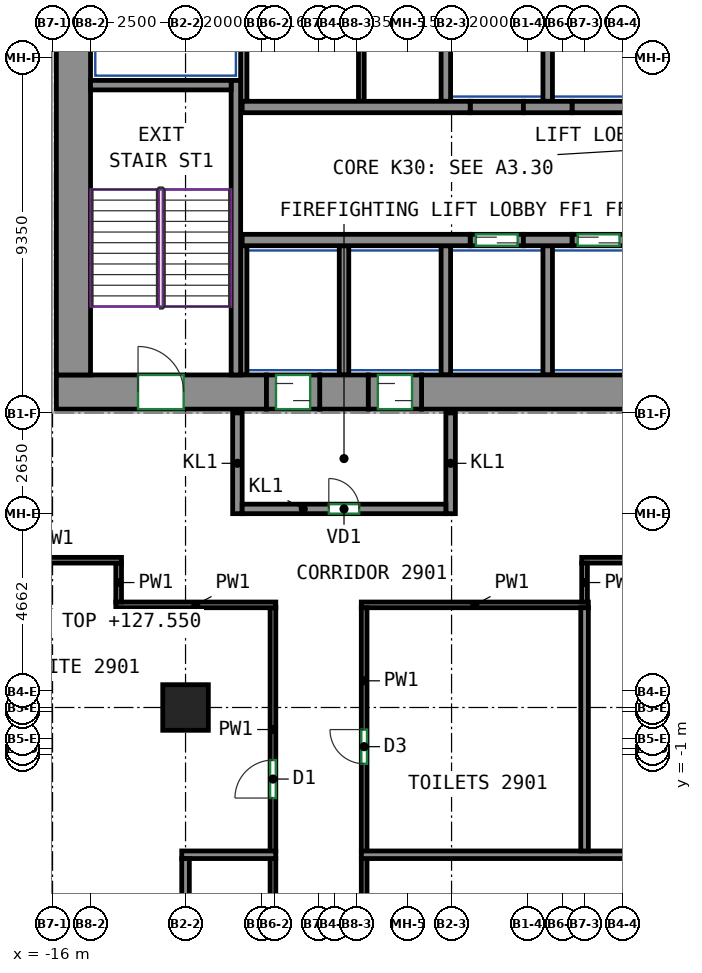
"""IFC4 building model, lengths in metres.
Left out: names, types, materials, properties, quantities, classifications, styles, units other than length and angle.
Written with IfcOpenShell. Run it as: python <this file> out.ifc"""

import sys

from ifc_helpers import new_model, si_unit, direction, frame, frame_2d, origin, origin_2d, place, context, subcontext, project, spatial, rectangle, extrude, source, transform, mapped, element, fill, save


model = new_model("IFC4")
c1 = context("Model", 3, precision=1e-05, world=origin(), true_north=direction((0.0, 1.0)))
c2 = subcontext(c1, "Body", "Model", "MODEL_VIEW")
j1 = project(units=[si_unit("LENGTHUNIT", "METRE"), si_unit("PLANEANGLEUNIT", "RADIAN")], contexts=[c1])
p1 = place(None, origin())
s1 = spatial("IfcSite", under=j1, at=p1, CompositionType="ELEMENT")
p2 = place(p1, origin())
s2 = spatial("IfcBuilding", under=s1, at=p2, CompositionType="ELEMENT")
p3 = place(p2, frame((0.0, 0.0, 124.6)))
s3 = spatial("IfcBuildingStorey", under=s2, at=p3, CompositionType="ELEMENT", Elevation=124.6)
m1 = source(origin(), c2, "Body", "SweptSolid", [
    extrude(rectangle(XDim=1.2, YDim=1.2, at=origin_2d()), origin(), (0.0, 0.0, 1.0), 3.6),
])
p4 = place(p3, frame((-12.5, 0.25, 0.0), z_axis=(0.0, 0.0, 1.0), x_axis=(1.0, 0.0, 0.0)))
e1 = element("IfcColumn", 1, at=p4, inside=s3, PredefinedType="COLUMN", context=c2, shape_type="MappedRepresentation", body=[
    mapped(m1, transform((0.0, 0.0, 0.0))),
])
m2 = source(origin(), c2, "Body", "SweptSolid", [
    extrude(rectangle(XDim=5.53, YDim=0.9, at=frame_2d((2.765, 0.0))), origin(), (0.0, 0.0, 1.0), 3.6),
])
p5 = place(p3, frame((-15.9, 8.55, 0.0), z_axis=(0.0, 0.0, 1.0), x_axis=(1.0, 0.0, 0.0)))
e2 = element("IfcWall", 2, at=p5, inside=s3, PredefinedType="SHEAR", context=c2, shape_type="MappedRepresentation", body=[
    mapped(m2, transform((0.0, 0.0, 0.0))),
])
p6 = place(p5, frame((2.15, 0.0, 0.0)))
e3 = element("IfcOpeningElement", 3, at=p6, cuts=e2, PredefinedType="OPENING", context=c2, shape_type="SweptSolid", body=[
    extrude(rectangle(XDim=1.2, YDim=2.1, at=frame_2d((0.6, 1.05))), frame((0.0, 0.46, 0.0), z_axis=(0.0, -1.0, 0.0), x_axis=(1.0, 0.0, 0.0)), (0.0, 0.0, 1.0), 0.92),
])
m3 = source(origin(), c2, "Body", "SweptSolid", [
    extrude(rectangle(XDim=1.28, YDim=0.9, at=frame_2d((0.64, 0.0))), origin(), (0.0, 0.0, 1.0), 3.6),
])
p7 = place(p3, frame((-8.97, 8.55, 0.0), z_axis=(0.0, 0.0, 1.0), x_axis=(1.0, 0.0, 0.0)))
e4 = element("IfcWall", 4, at=p7, inside=s3, PredefinedType="SHEAR", context=c2, shape_type="MappedRepresentation", body=[
    mapped(m3, transform((0.0, 0.0, 0.0))),
])
m4 = source(origin(), c2, "Body", "SweptSolid", [
    extrude(rectangle(XDim=14.18, YDim=0.9, at=frame_2d((7.09, 0.0))), origin(), (0.0, 0.0, 1.0), 3.6),
])
p8 = place(p3, frame((-6.29, 8.55, 0.0), z_axis=(0.0, 0.0, 1.0), x_axis=(1.0, 0.0, 0.0)))
e5 = element("IfcWall", 5, at=p8, inside=s3, PredefinedType="SHEAR", context=c2, shape_type="MappedRepresentation", body=[
    mapped(m4, transform((0.0, 0.0, 0.0))),
])
m5 = source(origin(), c2, "Body", "SweptSolid", [
    extrude(rectangle(XDim=12.0, YDim=0.9, at=frame_2d((6.0, 0.0))), origin(), (0.0, 0.0, 1.0), 3.6),
])
p9 = place(p3, frame((-15.45, 9.0, 0.0), z_axis=(0.0, 0.0, 1.0), x_axis=(0.0, 1.0, 0.0)))
e6 = element("IfcWall", 6, at=p9, inside=s3, PredefinedType="SHEAR", context=c2, shape_type="MappedRepresentation", body=[
    mapped(m5, transform((0.0, 0.0, 0.0))),
])
m6 = source(origin(), c2, "Body", "SweptSolid", [
    extrude(rectangle(XDim=7.75, YDim=0.25, at=frame_2d((3.875, 0.0))), origin(), (0.0, 0.0, 1.0), 3.6),
])
p10 = place(p3, frame((-11.175, 9.0, 0.0), z_axis=(0.0, 0.0, 1.0), x_axis=(0.0, 1.0, 0.0)))
e7 = element("IfcWall", 7, at=p10, inside=s3, PredefinedType="SHEAR", context=c2, shape_type="MappedRepresentation", body=[
    mapped(m6, transform((0.0, 0.0, 0.0))),
])
m7 = source(origin(), c2, "Body", "SweptSolid", [
    extrude(rectangle(XDim=3.7, YDim=0.25, at=frame_2d((1.85, 0.0))), origin(), (0.0, 0.0, 1.0), 3.6),
])
p11 = place(p3, frame((-15.0, 16.625, 0.0), z_axis=(0.0, 0.0, 1.0), x_axis=(1.0, 0.0, 0.0)))
e8 = element("IfcWall", 8, at=p11, inside=s3, PredefinedType="SHEAR", context=c2, shape_type="MappedRepresentation", body=[
    mapped(m7, transform((0.0, 0.0, 0.0))),
])
m8 = source(origin(), c2, "Body", "SweptSolid", [
    extrude(rectangle(XDim=6.0, YDim=0.3, at=frame_2d((3.0, 0.0))), origin(), (0.0, 0.0, 1.0), 3.6),
])
p12 = place(p3, frame((-11.01, 12.55, 0.0), z_axis=(0.0, 0.0, 1.0), x_axis=(1.0, 0.0, 0.0)))
e9 = element("IfcWall", 9, at=p12, inside=s3, PredefinedType="SHEAR", context=c2, shape_type="MappedRepresentation", body=[
    mapped(m8, transform((0.0, 0.0, 0.0))),
])
m9 = source(origin(), c2, "Body", "SweptSolid", [
    extrude(rectangle(XDim=1.28, YDim=0.3, at=frame_2d((0.64, 0.0))), origin(), (0.0, 0.0, 1.0), 3.6),
])
p13 = place(p3, frame((-3.61, 12.55, 0.0), z_axis=(0.0, 0.0, 1.0), x_axis=(1.0, 0.0, 0.0)))
e10 = element("IfcWall", 10, at=p13, inside=s3, PredefinedType="SHEAR", context=c2, shape_type="MappedRepresentation", body=[
    mapped(m9, transform((0.0, 0.0, 0.0))),
])
p14 = place(p3, frame((-11.01, 16.05, 0.0), z_axis=(0.0, 0.0, 1.0), x_axis=(1.0, 0.0, 0.0)))
e11 = element("IfcWall", 11, at=p14, inside=s3, PredefinedType="SHEAR", context=c2, shape_type="MappedRepresentation", body=[
    mapped(m8, transform((0.0, 0.0, 0.0))),
])
p15 = place(p3, frame((-3.61, 16.05, 0.0), z_axis=(0.0, 0.0, 1.0), x_axis=(1.0, 0.0, 0.0)))
e12 = element("IfcWall", 12, at=p15, inside=s3, PredefinedType="SHEAR", context=c2, shape_type="MappedRepresentation", body=[
    mapped(m9, transform((0.0, 0.0, 0.0))),
])
m10 = source(origin(), c2, "Body", "SweptSolid", [
    extrude(rectangle(XDim=1.4, YDim=0.3, at=frame_2d((0.7, 0.0))), origin(), (0.0, 0.0, 1.0), 3.6),
])
p16 = place(p3, frame((-5.01, 12.55, 0.0), z_axis=(0.0, 0.0, 1.0), x_axis=(1.0, 0.0, 0.0)))
e13 = element("IfcWall", 13, at=p16, inside=s3, PredefinedType="PARTITIONING", context=c2, shape_type="MappedRepresentation", body=[
    mapped(m10, transform((0.0, 0.0, 0.0))),
])
p17 = place(p16, frame((0.15, 0.0, 0.0)))
e14 = element("IfcOpeningElement", 14, at=p17, cuts=e13, PredefinedType="OPENING", context=c2, shape_type="SweptSolid", body=[
    extrude(rectangle(XDim=1.1, YDim=2.1, at=frame_2d((0.55, 1.05))), frame((0.0, 0.16, 0.0), z_axis=(0.0, -1.0, 0.0), x_axis=(1.0, 0.0, 0.0)), (0.0, 0.0, 1.0), 0.32),
])
m11 = source(origin(), c2, "Body", "SweptSolid", [
    extrude(rectangle(XDim=1.4, YDim=0.3, at=frame_2d((0.7, 0.0))), origin(), (0.0, 0.0, 1.0), 3.6),
])
p18 = place(p3, frame((-2.33, 12.55, 0.0), z_axis=(0.0, 0.0, 1.0), x_axis=(1.0, 0.0, 0.0)))
e15 = element("IfcWall", 15, at=p18, inside=s3, PredefinedType="PARTITIONING", context=c2, shape_type="MappedRepresentation", body=[
    mapped(m11, transform((0.0, 0.0, 0.0))),
])
p19 = place(p18, frame((0.15, 0.0, 0.0)))
e16 = element("IfcOpeningElement", 16, at=p19, cuts=e15, PredefinedType="OPENING", context=c2, shape_type="SweptSolid", body=[
    extrude(rectangle(XDim=1.1, YDim=2.1, at=frame_2d((0.55, 1.05))), frame((0.0, 0.16, 0.0), z_axis=(0.0, -1.0, 0.0), x_axis=(1.0, 0.0, 0.0)), (0.0, 0.0, 1.0), 0.32),
])
p20 = place(p3, frame((-5.01, 16.05, 0.0), z_axis=(0.0, 0.0, 1.0), x_axis=(1.0, 0.0, 0.0)))
e17 = element("IfcWall", 17, at=p20, inside=s3, PredefinedType="PARTITIONING", context=c2, shape_type="MappedRepresentation", body=[
    mapped(m10, transform((0.0, 0.0, 0.0))),
])
p21 = place(p3, frame((-2.33, 16.05, 0.0), z_axis=(0.0, 0.0, 1.0), x_axis=(1.0, 0.0, 0.0)))
e18 = element("IfcWall", 18, at=p21, inside=s3, PredefinedType="PARTITIONING", context=c2, shape_type="MappedRepresentation", body=[
    mapped(m11, transform((0.0, 0.0, 0.0))),
])
m12 = source(origin(), c2, "Body", "SweptSolid", [
    extrude(rectangle(XDim=2.65, YDim=0.25, at=frame_2d((1.325, 0.0))), origin(), (0.0, 0.0, 1.0), 3.6),
])
for number, where, z_axis, x_axis in (
    (19, (-11.135, 5.35, 0.0), (0.0, 0.0, 1.0), (0.0, 1.0, 0.0)),
    (20, (-5.525, 5.35, 0.0), (0.0, 0.0, 1.0), (0.0, 1.0, 0.0)),
):
    element("IfcWall", number, at=place(p3, frame(where, z_axis=z_axis, x_axis=x_axis)), inside=s3, PredefinedType="PARTITIONING", context=c2, shape_type="MappedRepresentation", body=[
        mapped(m12, transform((0.0, 0.0, 0.0))),
    ])
m13 = source(origin(), c2, "Body", "SweptSolid", [
    extrude(rectangle(XDim=5.36, YDim=0.25, at=frame_2d((2.68, 0.0))), origin(), (0.0, 0.0, 1.0), 3.6),
])
p22 = place(p3, frame((-11.01, 5.475, 0.0), z_axis=(0.0, 0.0, 1.0), x_axis=(1.0, 0.0, 0.0)))
e21 = element("IfcWall", 21, at=p22, inside=s3, PredefinedType="PARTITIONING", context=c2, shape_type="MappedRepresentation", body=[
    mapped(m13, transform((0.0, 0.0, 0.0))),
])
p23 = place(p22, frame((2.28, 0.0, 0.0)))
e22 = element("IfcOpeningElement", 22, at=p23, cuts=e21, PredefinedType="OPENING", context=c2, shape_type="SweptSolid", body=[
    extrude(rectangle(XDim=0.8, YDim=2.0, at=frame_2d((0.4, 1.0))), frame((0.0, 0.135, 0.0), z_axis=(0.0, -1.0, 0.0), x_axis=(1.0, 0.0, 0.0)), (0.0, 0.0, 1.0), 0.27),
])
m14 = source(origin(), c2, "Body", "SweptSolid", [
    extrude(rectangle(XDim=4.8, YDim=0.165, at=frame_2d((2.4, 0.0))), origin(), (0.0, 0.0, 1.0), 3.6),
])
p24 = place(p3, frame((-10.968, 16.2, 0.0), z_axis=(0.0, 0.0, 1.0), x_axis=(0.0, 1.0, 0.0)))
e23 = element("IfcWall", 23, at=p24, inside=s3, PredefinedType="PARTITIONING", context=c2, shape_type="MappedRepresentation", body=[
    mapped(m14, transform((0.0, 0.0, 0.0))),
])
m15 = source(origin(), c2, "Body", "SweptSolid", [
    extrude(rectangle(XDim=3.275, YDim=0.25, at=frame_2d((1.638, 0.0))), origin(), (0.0, 0.0, 1.0), 3.6),
])
for number, where, z_axis, x_axis in (
    (24, (-2.97, 16.2, 0.0), (0.0, 0.0, 1.0), (0.0, 1.0, 0.0)),
    (25, (-5.65, 16.2, 0.0), (0.0, 0.0, 1.0), (0.0, 1.0, 0.0)),
):
    element("IfcWall", number, at=place(p3, frame(where, z_axis=z_axis, x_axis=x_axis)), inside=s3, PredefinedType="PARTITIONING", context=c2, shape_type="MappedRepresentation", body=[
        mapped(m15, transform((0.0, 0.0, 0.0))),
    ])
m16 = source(origin(), c2, "Body", "SweptSolid", [
    extrude(rectangle(XDim=3.4, YDim=0.165, at=frame_2d((1.7, 0.0))), origin(), (0.0, 0.0, 1.0), 3.6),
])
p25 = place(p3, frame((-10.968, 9.0, 0.0), z_axis=(0.0, 0.0, 1.0), x_axis=(0.0, 1.0, 0.0)))
e26 = element("IfcWall", 26, at=p25, inside=s3, PredefinedType="PARTITIONING", context=c2, shape_type="MappedRepresentation", body=[
    mapped(m16, transform((0.0, 0.0, 0.0))),
])
m17 = source(origin(), c2, "Body", "SweptSolid", [
    extrude(rectangle(XDim=3.4, YDim=0.25, at=frame_2d((1.7, 0.0))), origin(), (0.0, 0.0, 1.0), 3.6),
])
for number, where, z_axis, x_axis in (
    (27, (-2.97, 9.0, 0.0), (0.0, 0.0, 1.0), (0.0, 1.0, 0.0)),
    (28, (-5.65, 9.0, 0.0), (0.0, 0.0, 1.0), (0.0, 1.0, 0.0)),
    (29, (-8.33, 9.0, 0.0), (0.0, 0.0, 1.0), (0.0, 1.0, 0.0)),
):
    element("IfcWall", number, at=place(p3, frame(where, z_axis=z_axis, x_axis=x_axis)), inside=s3, PredefinedType="PARTITIONING", context=c2, shape_type="MappedRepresentation", body=[
        mapped(m17, transform((0.0, 0.0, 0.0))),
    ])
m18 = source(origin(), c2, "Body", "SweptSolid", [
    extrude(rectangle(XDim=4.8, YDim=0.15, at=frame_2d((2.4, 0.0))), origin(), (0.0, 0.0, 1.0), 3.6),
])
p26 = place(p3, frame((-7.875, 16.2, 0.0), z_axis=(0.0, 0.0, 1.0), x_axis=(0.0, 1.0, 0.0)))
e30 = element("IfcWall", 30, at=p26, inside=s3, PredefinedType="PARTITIONING", context=c2, shape_type="MappedRepresentation", body=[
    mapped(m18, transform((0.0, 0.0, 0.0))),
])
m19 = source(origin(), c2, "Body", "SweptSolid", [
    extrude(rectangle(XDim=1.4, YDim=0.9, at=frame_2d((0.7, 0.0))), origin(), (0.0, 0.0, 1.0), 2.7),
])
p27 = place(p3, frame((-10.37, 8.55, 0.0), z_axis=(0.0, 0.0, 1.0), x_axis=(1.0, 0.0, 0.0)))
e31 = element("IfcWall", 31, at=p27, inside=s3, PredefinedType="PARTITIONING", context=c2, shape_type="MappedRepresentation", body=[
    mapped(m19, transform((0.0, 0.0, 0.0))),
])
p28 = place(p27, frame((0.25, 0.0, 0.0)))
e32 = element("IfcOpeningElement", 32, at=p28, cuts=e31, PredefinedType="OPENING", context=c2, shape_type="SweptSolid", body=[
    extrude(rectangle(XDim=0.9, YDim=2.1, at=frame_2d((0.45, 1.05))), frame((0.0, 0.46, 0.0), z_axis=(0.0, -1.0, 0.0), x_axis=(1.0, 0.0, 0.0)), (0.0, 0.0, 1.0), 0.92),
])
m20 = source(origin(), c2, "Body", "SweptSolid", [
    extrude(rectangle(XDim=1.4, YDim=0.9, at=frame_2d((0.7, 0.0))), origin(), (0.0, 0.0, 1.0), 2.7),
])
p29 = place(p3, frame((-7.69, 8.55, 0.0), z_axis=(0.0, 0.0, 1.0), x_axis=(1.0, 0.0, 0.0)))
e33 = element("IfcWall", 33, at=p29, inside=s3, PredefinedType="PARTITIONING", context=c2, shape_type="MappedRepresentation", body=[
    mapped(m20, transform((0.0, 0.0, 0.0))),
])
p30 = place(p29, frame((0.25, 0.0, 0.0)))
e34 = element("IfcOpeningElement", 34, at=p30, cuts=e33, PredefinedType="OPENING", context=c2, shape_type="SweptSolid", body=[
    extrude(rectangle(XDim=0.9, YDim=2.1, at=frame_2d((0.45, 1.05))), frame((0.0, 0.46, 0.0), z_axis=(0.0, -1.0, 0.0), x_axis=(1.0, 0.0, 0.0)), (0.0, 0.0, 1.0), 0.92),
])
p31 = place(p3, frame((-10.2, -3.535, 0.0), z_axis=(0.0, 0.0, 1.0), x_axis=(0.0, 1.0, 0.0)))
e35 = element("IfcWall", 35, at=p31, inside=s3, PredefinedType="PARTITIONING", context=c2, shape_type="SweptSolid", body=[
    extrude(rectangle(XDim=6.41, YDim=0.15, at=frame_2d((3.205, 0.0))), origin(), (0.0, 0.0, 1.0), 3.6),
])
p32 = place(p31, frame((1.402, 0.0, 0.0)))
e36 = element("IfcOpeningElement", 36, at=p32, cuts=e35, PredefinedType="OPENING", context=c2, shape_type="SweptSolid", body=[
    extrude(rectangle(XDim=1.0, YDim=2.1, at=frame_2d((0.5, 1.05))), frame((0.0, 0.085, 0.0), z_axis=(0.0, -1.0, 0.0), x_axis=(1.0, 0.0, 0.0)), (0.0, 0.0, 1.0), 0.17),
])
p33 = place(p3, frame((-14.335, 2.95, 0.0), z_axis=(0.0, 0.0, 1.0), x_axis=(1.0, 0.0, 0.0)))
e37 = element("IfcWall", 37, at=p33, inside=s3, PredefinedType="PARTITIONING", context=c2, shape_type="SweptSolid", body=[
    extrude(rectangle(XDim=4.21, YDim=0.15, at=frame_2d((2.105, 0.0))), origin(), (0.0, 0.0, 1.0), 3.6),
])
p34 = place(p3, frame((-14.26, 4.05, 0.0), z_axis=(0.0, 0.0, 1.0), x_axis=(0.0, -1.0, 0.0)))
e38 = element("IfcWall", 38, at=p34, inside=s3, PredefinedType="PARTITIONING", context=c2, shape_type="SweptSolid", body=[
    extrude(rectangle(XDim=1.025, YDim=0.15, at=frame_2d((0.513, 0.0))), origin(), (0.0, 0.0, 1.0), 3.6),
])
p35 = place(p3, frame((-19.575, 4.125, 0.0), z_axis=(0.0, 0.0, 1.0), x_axis=(1.0, 0.0, 0.0)))
e39 = element("IfcWall", 39, at=p35, inside=s3, PredefinedType="PARTITIONING", context=c2, shape_type="SweptSolid", body=[
    extrude(rectangle(XDim=5.39, YDim=0.15, at=frame_2d((2.695, 0.0))), origin(), (0.0, 0.0, 1.0), 3.6),
])
p36 = place(p3, frame((-10.2, -15.675, 0.0), z_axis=(0.0, 0.0, 1.0), x_axis=(0.0, 1.0, 0.0)))
e40 = element("IfcWall", 40, at=p36, inside=s3, PredefinedType="PARTITIONING", context=c2, shape_type="SweptSolid", body=[
    extrude(rectangle(XDim=11.96, YDim=0.15, at=frame_2d((5.98, 0.0))), origin(), (0.0, 0.0, 1.0), 3.6),
])
p37 = place(p36, frame((3.016, 0.0, 0.0)))
e41 = element("IfcOpeningElement", 41, at=p37, cuts=e40, PredefinedType="OPENING", context=c2, shape_type="SweptSolid", body=[
    extrude(rectangle(XDim=1.0, YDim=2.1, at=frame_2d((0.5, 1.05))), frame((0.0, 0.085, 0.0), z_axis=(0.0, -1.0, 0.0), x_axis=(1.0, 0.0, 0.0)), (0.0, 0.0, 1.0), 0.17),
])
p38 = place(p3, frame((-7.875, 2.95, 0.0), z_axis=(0.0, 0.0, 1.0), x_axis=(1.0, 0.0, 0.0)))
e42 = element("IfcWall", 42, at=p38, inside=s3, PredefinedType="PARTITIONING", context=c2, shape_type="SweptSolid", body=[
    extrude(rectangle(XDim=5.975, YDim=0.15, at=frame_2d((2.988, 0.0))), origin(), (0.0, 0.0, 1.0), 3.6),
])
p39 = place(p3, frame((-7.8, -3.535, 0.0), z_axis=(0.0, 0.0, 1.0), x_axis=(0.0, 1.0, 0.0)))
e43 = element("IfcWall", 43, at=p39, inside=s3, PredefinedType="PARTITIONING", context=c2, shape_type="SweptSolid", body=[
    extrude(rectangle(XDim=6.41, YDim=0.15, at=frame_2d((3.205, 0.0))), origin(), (0.0, 0.0, 1.0), 3.6),
])
p40 = place(p39, frame((2.304, 0.0, 0.0)))
e44 = element("IfcOpeningElement", 44, at=p40, cuts=e43, PredefinedType="OPENING", context=c2, shape_type="SweptSolid", body=[
    extrude(rectangle(XDim=0.9, YDim=2.1, at=frame_2d((0.45, 1.05))), frame((0.0, 0.085, 0.0), z_axis=(0.0, -1.0, 0.0), x_axis=(1.0, 0.0, 0.0)), (0.0, 0.0, 1.0), 0.17),
])
p41 = place(p3, frame((-7.8, -11.285, 0.0), z_axis=(0.0, 0.0, 1.0), x_axis=(0.0, 1.0, 0.0)))
e45 = element("IfcWall", 45, at=p41, inside=s3, PredefinedType="PARTITIONING", context=c2, shape_type="SweptSolid", body=[
    extrude(rectangle(XDim=7.57, YDim=0.15, at=frame_2d((3.785, 0.0))), origin(), (0.0, 0.0, 1.0), 3.6),
])
p42 = place(p41, frame((4.346, 0.0, 0.0)))
e46 = element("IfcOpeningElement", 46, at=p42, cuts=e45, PredefinedType="OPENING", context=c2, shape_type="SweptSolid", body=[
    extrude(rectangle(XDim=0.9, YDim=2.1, at=frame_2d((0.45, 1.05))), frame((0.0, 0.085, 0.0), z_axis=(0.0, -1.0, 0.0), x_axis=(1.0, 0.0, 0.0)), (0.0, 0.0, 1.0), 0.17),
])
p43 = place(p3, frame((-2.075, 4.125, 0.0), z_axis=(0.0, 0.0, 1.0), x_axis=(1.0, 0.0, 0.0)))
e47 = element("IfcWall", 47, at=p43, inside=s3, PredefinedType="PARTITIONING", context=c2, shape_type="SweptSolid", body=[
    extrude(rectangle(XDim=10.65, YDim=0.15, at=frame_2d((5.325, 0.0))), origin(), (0.0, 0.0, 1.0), 3.6),
])
p44 = place(p43, frame((5.227, 0.0, 0.0)))
e48 = element("IfcOpeningElement", 48, at=p44, cuts=e47, PredefinedType="OPENING", context=c2, shape_type="SweptSolid", body=[
    extrude(rectangle(XDim=0.9, YDim=2.1, at=frame_2d((0.45, 1.05))), frame((0.0, 0.085, 0.0), z_axis=(0.0, -1.0, 0.0), x_axis=(1.0, 0.0, 0.0)), (0.0, 0.0, 1.0), 0.17),
])
p45 = place(p3, frame((-2.0, 3.025, 0.0), z_axis=(0.0, 0.0, 1.0), x_axis=(0.0, 1.0, 0.0)))
e49 = element("IfcWall", 49, at=p45, inside=s3, PredefinedType="PARTITIONING", context=c2, shape_type="SweptSolid", body=[
    extrude(rectangle(XDim=1.025, YDim=0.15, at=frame_2d((0.513, 0.0))), origin(), (0.0, 0.0, 1.0), 3.6),
])
p46 = place(p3, frame((-12.6, -3.625, 0.0), z_axis=(0.0, 0.0, 1.0), x_axis=(1.0, 0.0, 0.0)))
e50 = element("IfcWall", 50, at=p46, inside=s3, PredefinedType="PARTITIONING", context=c2, shape_type="SweptSolid", body=[
    extrude(rectangle(XDim=2.474, YDim=0.2, at=frame_2d((1.237, 0.0))), origin(), (0.0, 0.0, 1.0), 3.6),
])
p47 = place(p3, frame((-12.5, -6.9, 0.0), z_axis=(0.0, 0.0, 1.0), x_axis=(0.0, 1.0, 0.0)))
e51 = element("IfcWall", 51, at=p47, inside=s3, PredefinedType="PARTITIONING", context=c2, shape_type="SweptSolid", body=[
    extrude(rectangle(XDim=3.175, YDim=0.2, at=frame_2d((1.587, 0.0))), origin(), (0.0, 0.0, 1.0), 2.95),
])
p48 = place(p3, frame((-7.874, -3.625, 0.0), z_axis=(0.0, 0.0, 1.0), x_axis=(1.0, 0.0, 0.0)))
e52 = element("IfcWall", 52, at=p48, inside=s3, PredefinedType="PARTITIONING", context=c2, shape_type="SweptSolid", body=[
    extrude(rectangle(XDim=9.474, YDim=0.2, at=frame_2d((4.737, 0.0))), origin(), (0.0, 0.0, 1.0), 3.6),
])
p49 = place(p3, frame((-2.0, -3.525, 0.0), z_axis=(0.0, 0.0, 1.0), x_axis=(0.0, 1.0, 0.0)))
e53 = element("IfcWall", 53, at=p49, inside=s3, PredefinedType="PARTITIONING", context=c2, shape_type="SweptSolid", body=[
    extrude(rectangle(XDim=6.399, YDim=0.2, at=frame_2d((3.199, 0.0))), origin(), (0.0, 0.0, 1.0), 3.6),
])
p50 = place(p23, origin())
e54 = element("IfcDoor", 54, at=p50, inside=s3, OperationType="SINGLE_SWING_LEFT", PredefinedType="DOOR", context=c2, shape_type="SweptSolid", body=[
    extrude(rectangle(XDim=0.8, YDim=2.0, at=frame_2d((0.4, 1.0))), frame((0.0, 0.025, 0.0), z_axis=(0.0, -1.0, 0.0), x_axis=(1.0, 0.0, 0.0)), (0.0, 0.0, 1.0), 0.05),
])
fill(e22, e54)
p51 = place(p28, origin())
e55 = element("IfcDoor", 55, at=p51, inside=s3, OperationType="SLIDING_TO_LEFT", PredefinedType="DOOR", context=c2, shape_type="SweptSolid", body=[
    extrude(rectangle(XDim=0.9, YDim=2.1, at=frame_2d((0.45, 1.05))), frame((0.0, 0.355, 0.0), z_axis=(0.0, -1.0, 0.0), x_axis=(1.0, 0.0, 0.0)), (0.0, 0.0, 1.0), 0.05),
])
fill(e32, e55)
p52 = place(p30, origin())
e56 = element("IfcDoor", 56, at=p52, inside=s3, OperationType="SLIDING_TO_RIGHT", PredefinedType="DOOR", context=c2, shape_type="SweptSolid", body=[
    extrude(rectangle(XDim=0.9, YDim=2.1, at=frame_2d((0.45, 1.05))), frame((0.0, 0.355, 0.0), z_axis=(0.0, -1.0, 0.0), x_axis=(1.0, 0.0, 0.0)), (0.0, 0.0, 1.0), 0.05),
])
fill(e34, e56)
p53 = place(p17, origin())
e57 = element("IfcDoor", 57, at=p53, inside=s3, OperationType="DOUBLE_DOOR_SLIDING", PredefinedType="DOOR", context=c2, shape_type="SweptSolid", body=[
    extrude(rectangle(XDim=1.1, YDim=2.1, at=frame_2d((0.55, 1.05))), frame((0.0, 0.025, 0.0), z_axis=(0.0, -1.0, 0.0), x_axis=(1.0, 0.0, 0.0)), (0.0, 0.0, 1.0), 0.05),
])
fill(e14, e57)
p54 = place(p19, origin())
e58 = element("IfcDoor", 58, at=p54, inside=s3, OperationType="DOUBLE_DOOR_SLIDING", PredefinedType="DOOR", context=c2, shape_type="SweptSolid", body=[
    extrude(rectangle(XDim=1.1, YDim=2.1, at=frame_2d((0.55, 1.05))), frame((0.0, 0.025, 0.0), z_axis=(0.0, -1.0, 0.0), x_axis=(1.0, 0.0, 0.0)), (0.0, 0.0, 1.0), 0.05),
])
fill(e16, e58)
p55 = place(p6, origin())
e59 = element("IfcDoor", 59, at=p55, inside=s3, OperationType="DOUBLE_DOOR_SINGLE_SWING", PredefinedType="DOOR", context=c2, shape_type="SweptSolid", body=[
    extrude(rectangle(XDim=1.2, YDim=2.1, at=frame_2d((0.6, 1.05))), frame((0.0, 0.355, 0.0), z_axis=(0.0, -1.0, 0.0), x_axis=(1.0, 0.0, 0.0)), (0.0, 0.0, 1.0), 0.05),
])
fill(e3, e59)
p56 = place(p32, origin())
e60 = element("IfcDoor", 60, at=p56, inside=s3, OperationType="SINGLE_SWING_LEFT", PredefinedType="DOOR", context=c2, shape_type="SweptSolid", body=[
    extrude(rectangle(XDim=1.0, YDim=2.1, at=frame_2d((0.5, 1.05))), frame((0.0, 0.025, 0.0), z_axis=(0.0, -1.0, 0.0), x_axis=(1.0, 0.0, 0.0)), (0.0, 0.0, 1.0), 0.05),
])
fill(e36, e60)
p57 = place(p40, origin())
e61 = element("IfcDoor", 61, at=p57, inside=s3, OperationType="SINGLE_SWING_RIGHT", PredefinedType="DOOR", context=c2, shape_type="SweptSolid", body=[
    extrude(rectangle(XDim=0.9, YDim=2.1, at=frame_2d((0.45, 1.05))), frame((0.0, 0.025, 0.0), z_axis=(0.0, -1.0, 0.0), x_axis=(1.0, 0.0, 0.0)), (0.0, 0.0, 1.0), 0.05),
])
fill(e44, e61)
save(model, sys.argv[1])
